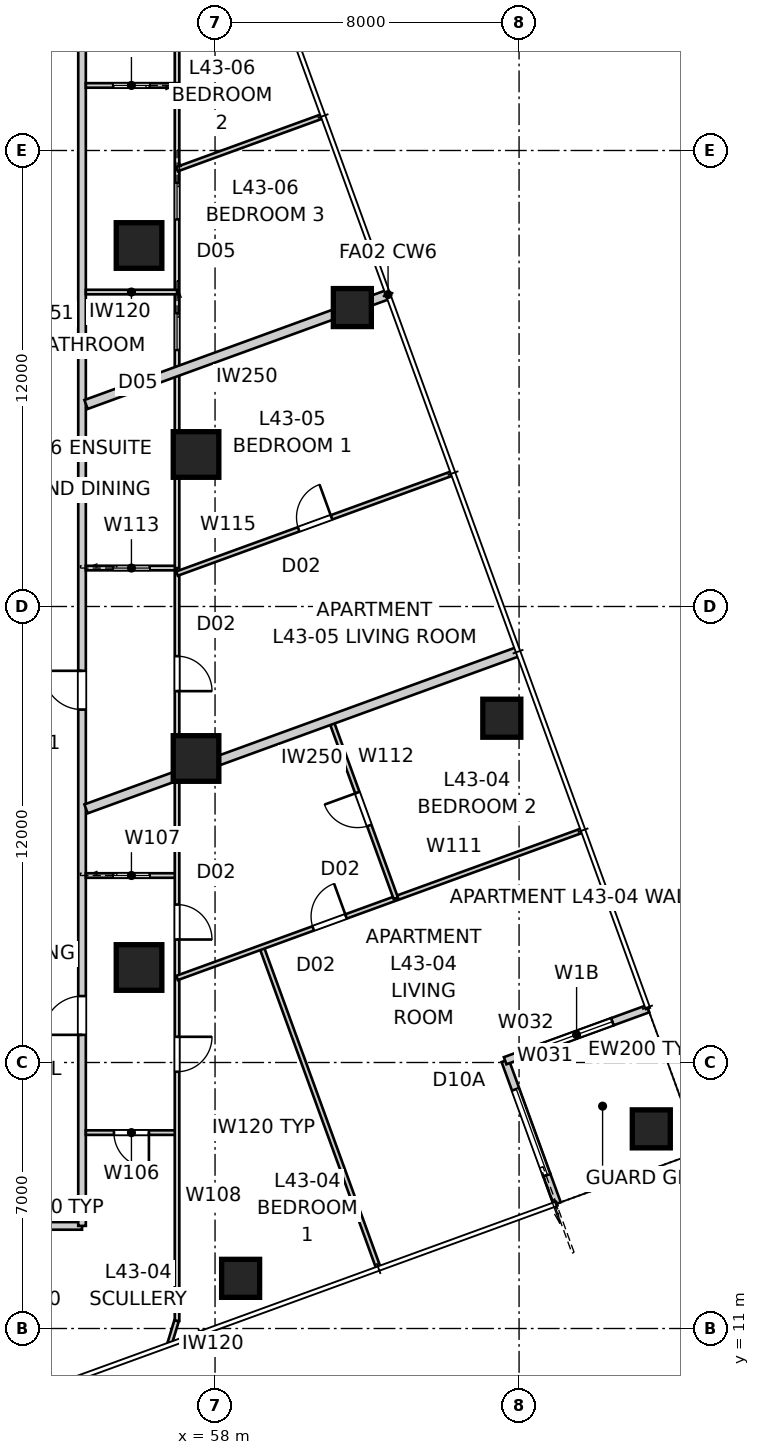
"""IFC4 building model, lengths in metres.
Left out: names, types, materials, properties, quantities, classifications, styles, units other than length and angle.
Written with IfcOpenShell. Run it as: python <this file> out.ifc"""

import sys

from ifc_helpers import new_model, si_unit, direction, frame, frame_2d, origin, origin_2d, place, context, subcontext, project, spatial, rectangle, extrude, element, fill, save


model = new_model("IFC4")
c1 = context("Model", 3, precision=1e-05, world=origin(), true_north=direction((0.0, 1.0)))
c2 = subcontext(c1, "Body", "Model", "MODEL_VIEW")
j1 = project(units=[si_unit("LENGTHUNIT", "METRE"), si_unit("PLANEANGLEUNIT", "RADIAN")], contexts=[c1])
p1 = place(None, origin())
s1 = spatial("IfcSite", under=j1, at=p1, CompositionType="ELEMENT")
p2 = place(p1, origin())
s2 = spatial("IfcBuilding", under=s1, at=p2, CompositionType="ELEMENT")
p3 = place(p2, frame((0.0, 0.0, 157.4)))
s3 = spatial("IfcBuildingStorey", under=s2, at=p3, CompositionType="ELEMENT", Elevation=157.4)
for number, where, z_axis, x_axis in (
    (1, (58.673, 12.32, 0.0), (0.0, 0.0, 1.0), (1.0, 0.0, 0.0)),
    (2, (69.479, 16.253, 0.0), (0.0, 0.0, 1.0), (1.0, 0.0, 0.0)),
    (3, (65.546, 27.06, 0.0), (0.0, 0.0, 1.0), (1.0, 0.0, 0.0)),
    (4, (61.613, 37.866, 0.0), (0.0, 0.0, 1.0), (1.0, 0.0, 0.0)),
):
    element("IfcColumn", number, at=place(p3, frame(where, z_axis=z_axis, x_axis=x_axis)), inside=s3, PredefinedType="COLUMN", context=c2, shape_type="SweptSolid", body=[
        extrude(rectangle(XDim=1.0, YDim=1.0, at=origin_2d()), origin(), (0.0, 0.0, 1.0), 3.4),
    ])
for number, where, z_axis, x_axis in (
    (5, (57.5, 26.0, 0.0), (0.0, 0.0, 1.0), (1.0, 0.0, 0.0)),
    (6, (57.5, 34.0, 0.0), (0.0, 0.0, 1.0), (1.0, 0.0, 0.0)),
    (7, (56.0, 39.5, 0.0), (0.0, 0.0, 1.0), (1.0, 0.0, 0.0)),
    (8, (56.0, 20.5, 0.0), (0.0, 0.0, 1.0), (1.0, 0.0, 0.0)),
):
    element("IfcColumn", number, at=place(p3, frame(where, z_axis=z_axis, x_axis=x_axis)), inside=s3, PredefinedType="COLUMN", context=c2, shape_type="SweptSolid", body=[
        extrude(rectangle(XDim=1.2, YDim=1.2, at=origin_2d()), origin(), (0.0, 0.0, 1.0), 3.4),
    ])
p4 = place(p3, frame((67.002, 14.288, 0.0), z_axis=(0.0, 0.0, 1.0), x_axis=(-0.342110593602, 0.939659694648, 0.0)))
e9 = element("IfcWall", 9, at=p4, inside=s3, PredefinedType="SOLIDWALL", context=c2, shape_type="SweptSolid", body=[
    extrude(rectangle(XDim=0.8, YDim=0.2, at=frame_2d((0.4, 0.0))), origin(), (0.0, 0.0, 1.0), 3.25),
])
p5 = place(p3, frame((66.729, 15.04, 0.0), z_axis=(0.0, 0.0, 1.0), x_axis=(-0.342018703306, 0.939693144909, 0.0)))
e10 = element("IfcWall", 10, at=p5, inside=s3, PredefinedType="SOLIDWALL", context=c2, shape_type="SweptSolid", body=[
    extrude(rectangle(XDim=3.2, YDim=0.2, at=frame_2d((1.6, 0.0))), origin(), (0.0, 0.0, 1.0), 2.722),
])
p6 = place(p5, origin())
e11 = element("IfcOpeningElement", 11, at=p6, cuts=e10, PredefinedType="OPENING", context=c2, shape_type="SweptSolid", body=[
    extrude(rectangle(XDim=2.4, YDim=2.1, at=frame_2d((1.2, 1.05))), frame((0.0, 0.11, 0.0), z_axis=(0.0, -1.0, 0.0), x_axis=(1.0, 0.0, 0.0)), (0.0, 0.0, 1.0), 0.22),
])
p7 = place(p3, frame((65.634, 18.047, 0.0), z_axis=(0.0, 0.0, 1.0), x_axis=(0.939712609717, 0.341965219194, 0.0)))
e12 = element("IfcWall", 12, at=p7, inside=s3, PredefinedType="SOLIDWALL", context=c2, shape_type="SweptSolid", body=[
    extrude(rectangle(XDim=3.0, YDim=0.2, at=frame_2d((1.5, 0.0))), origin(), (0.0, 0.0, 1.0), 2.722),
])
p8 = place(p7, frame((1.0, 0.0, 0.45)))
e13 = element("IfcOpeningElement", 13, at=p8, cuts=e12, PredefinedType="OPENING", context=c2, shape_type="SweptSolid", body=[
    extrude(rectangle(XDim=2.0, YDim=1.8, at=frame_2d((1.0, 0.9))), frame((0.0, 0.11, 0.0), z_axis=(0.0, -1.0, 0.0), x_axis=(1.0, 0.0, 0.0)), (0.0, 0.0, 1.0), 0.22),
])
p9 = place(p3, frame((68.453, 19.073, 0.0), z_axis=(0.0, 0.0, 1.0), x_axis=(0.939686455819, 0.342037080957, 0.0)))
e14 = element("IfcWall", 14, at=p9, inside=s3, PredefinedType="SOLIDWALL", context=c2, shape_type="SweptSolid", body=[
    extrude(rectangle(XDim=1.0, YDim=0.2, at=frame_2d((0.5, 0.0))), origin(), (0.0, 0.0, 1.0), 3.25),
])
p10 = place(p3, frame((49.242, 13.7, 0.0), z_axis=(0.0, 0.0, 1.0), x_axis=(1.0, 0.0, 0.0)))
e15 = element("IfcWall", 15, at=p10, inside=s3, PredefinedType="PARTITIONING", context=c2, shape_type="SweptSolid", body=[
    extrude(rectangle(XDim=5.258, YDim=0.2, at=frame_2d((2.629, 0.0))), origin(), (0.0, 0.0, 1.0), 3.25),
])
p11 = place(p3, frame((54.5, 13.7, 0.0), z_axis=(0.0, 0.0, 1.0), x_axis=(0.0, 1.0, 0.0)))
e16 = element("IfcWall", 16, at=p11, inside=s3, PredefinedType="PARTITIONING", context=c2, shape_type="SweptSolid", body=[
    extrude(rectangle(XDim=33.4, YDim=0.2, at=frame_2d((16.7, 0.0))), origin(), (0.0, 0.0, 1.0), 3.25),
])
p12 = place(p11, frame((5.028, 0.0, 0.0)))
e17 = element("IfcOpeningElement", 17, at=p12, cuts=e16, PredefinedType="OPENING", context=c2, shape_type="SweptSolid", body=[
    extrude(rectangle(XDim=1.02, YDim=2.1, at=frame_2d((0.51, 1.05))), frame((0.0, 0.11, 0.0), z_axis=(0.0, -1.0, 0.0), x_axis=(1.0, 0.0, 0.0)), (0.0, 0.0, 1.0), 0.22),
])
p13 = place(p11, frame((13.587, 0.0, 0.0)))
e18 = element("IfcOpeningElement", 18, at=p13, cuts=e16, PredefinedType="OPENING", context=c2, shape_type="SweptSolid", body=[
    extrude(rectangle(XDim=1.02, YDim=2.34, at=frame_2d((0.51, 1.17))), frame((0.0, 0.11, 0.0), z_axis=(0.0, -1.0, 0.0), x_axis=(1.0, 0.0, 0.0)), (0.0, 0.0, 1.0), 0.22),
])
p14 = place(p3, frame((62.553, 38.208, 0.0), z_axis=(0.0, 0.0, 1.0), x_axis=(-0.939695617736, -0.342011909161, 0.0)))
e19 = element("IfcWall", 19, at=p14, inside=s3, PredefinedType="PARTITIONING", context=c2, shape_type="SweptSolid", body=[
    extrude(rectangle(XDim=8.458, YDim=0.25, at=frame_2d((4.229, 0.0))), origin(), (0.0, 0.0, 1.0), 3.25),
])
p15 = place(p3, frame((65.973, 28.812, 0.0), z_axis=(0.0, 0.0, 1.0), x_axis=(-0.939693801585, -0.342016899091, 0.0)))
e20 = element("IfcWall", 20, at=p15, inside=s3, PredefinedType="PARTITIONING", context=c2, shape_type="SweptSolid", body=[
    extrude(rectangle(XDim=12.097, YDim=0.25, at=frame_2d((6.049, 0.0))), origin(), (0.0, 0.0, 1.0), 3.25),
])
p16 = place(p3, frame((57.0, 16.155, 0.0), z_axis=(0.0, 0.0, 1.0), x_axis=(-1.0, 0.0, 0.0)))
e21 = element("IfcWall", 21, at=p16, inside=s3, PredefinedType="PARTITIONING", context=c2, shape_type="SweptSolid", body=[
    extrude(rectangle(XDim=2.4, YDim=0.12, at=frame_2d((1.2, 0.0))), origin(), (0.0, 0.0, 1.0), 3.25),
])
p17 = place(p16, frame((0.74, 0.0, 0.0)))
e22 = element("IfcOpeningElement", 22, at=p17, cuts=e21, PredefinedType="OPENING", context=c2, shape_type="SweptSolid", body=[
    extrude(rectangle(XDim=0.92, YDim=2.34, at=frame_2d((0.46, 1.17))), frame((0.0, 0.07, 0.0), z_axis=(0.0, -1.0, 0.0), x_axis=(1.0, 0.0, 0.0)), (0.0, 0.0, 1.0), 0.14),
])
p18 = place(p3, frame((54.6, 22.921, 0.0), z_axis=(0.0, 0.0, 1.0), x_axis=(1.0, 0.0, 0.0)))
e23 = element("IfcWall", 23, at=p18, inside=s3, PredefinedType="PARTITIONING", context=c2, shape_type="SweptSolid", body=[
    extrude(rectangle(XDim=2.4, YDim=0.12, at=frame_2d((1.2, 0.0))), origin(), (0.0, 0.0, 1.0), 3.25),
])
p19 = place(p18, frame((0.72, 0.0, 0.0)))
e24 = element("IfcOpeningElement", 24, at=p19, cuts=e23, PredefinedType="OPENING", context=c2, shape_type="SweptSolid", body=[
    extrude(rectangle(XDim=0.96, YDim=2.1, at=frame_2d((0.48, 1.05))), frame((0.0, 0.07, 0.0), z_axis=(0.0, -1.0, 0.0), x_axis=(1.0, 0.0, 0.0)), (0.0, 0.0, 1.0), 0.14),
])
p20 = place(p3, frame((57.0, 30.92, 0.0), z_axis=(0.0, 0.0, 1.0), x_axis=(0.0, -1.0, 0.0)))
e25 = element("IfcWall", 25, at=p20, inside=s3, PredefinedType="PARTITIONING", context=c2, shape_type="SweptSolid", body=[
    extrude(rectangle(XDim=19.72, YDim=0.12, at=frame_2d((9.86, 0.0))), origin(), (0.0, 0.0, 1.0), 2.55),
])
p21 = place(p20, frame((12.243, 0.0, 0.0)))
e26 = element("IfcOpeningElement", 26, at=p21, cuts=e25, PredefinedType="OPENING", context=c2, shape_type="SweptSolid", body=[
    extrude(rectangle(XDim=0.92, YDim=2.34, at=frame_2d((0.46, 1.17))), frame((0.0, 0.07, 0.0), z_axis=(0.0, -1.0, 0.0), x_axis=(1.0, 0.0, 0.0)), (0.0, 0.0, 1.0), 0.14),
])
p22 = place(p20, frame((8.764, 0.0, 0.0)))
e27 = element("IfcOpeningElement", 27, at=p22, cuts=e25, PredefinedType="OPENING", context=c2, shape_type="SweptSolid", body=[
    extrude(rectangle(XDim=0.92, YDim=2.34, at=frame_2d((0.46, 1.17))), frame((0.0, 0.07, 0.0), z_axis=(0.0, -1.0, 0.0), x_axis=(1.0, 0.0, 0.0)), (0.0, 0.0, 1.0), 0.14),
])
p23 = place(p20, frame((2.227, 0.0, 0.0)))
e28 = element("IfcOpeningElement", 28, at=p23, cuts=e25, PredefinedType="OPENING", context=c2, shape_type="SweptSolid", body=[
    extrude(rectangle(XDim=0.92, YDim=2.34, at=frame_2d((0.46, 1.17))), frame((0.0, 0.07, 0.0), z_axis=(0.0, -1.0, 0.0), x_axis=(1.0, 0.0, 0.0)), (0.0, 0.0, 1.0), 0.14),
])
p24 = place(p3, frame((56.987, 11.2, 0.0), z_axis=(0.0, 0.0, 1.0), x_axis=(-0.290455219909, -0.956888585588, 0.0)))
e29 = element("IfcWall", 29, at=p24, inside=s3, PredefinedType="PARTITIONING", context=c2, shape_type="SweptSolid", body=[
    extrude(rectangle(XDim=0.605, YDim=0.12, at=frame_2d((0.303, 0.0))), origin(), (0.0, 0.0, 1.0), 3.25),
])
p25 = place(p3, frame((62.29, 12.615, 0.0), z_axis=(0.0, 0.0, 1.0), x_axis=(-0.342038393654, 0.939685978009, 0.0)))
e30 = element("IfcWall", 30, at=p25, inside=s3, PredefinedType="PARTITIONING", context=c2, shape_type="SweptSolid", body=[
    extrude(rectangle(XDim=8.96, YDim=0.12, at=frame_2d((4.48, 0.0))), origin(), (0.0, 0.0, 1.0), 3.25),
])
p26 = place(p3, frame((57.0, 20.225, 0.0), z_axis=(0.0, 0.0, 1.0), x_axis=(0.939693965364, 0.342016449105, 0.0)))
e31 = element("IfcWall", 31, at=p26, inside=s3, PredefinedType="PARTITIONING", context=c2, shape_type="SweptSolid", body=[
    extrude(rectangle(XDim=11.328, YDim=0.12, at=frame_2d((5.664, 0.0))), origin(), (0.0, 0.0, 1.0), 3.25),
])
p27 = place(p26, frame((3.812, 0.0, 0.0)))
e32 = element("IfcOpeningElement", 32, at=p27, cuts=e31, PredefinedType="OPENING", context=c2, shape_type="SweptSolid", body=[
    extrude(rectangle(XDim=0.92, YDim=2.34, at=frame_2d((0.46, 1.17))), frame((0.0, 0.07, 0.0), z_axis=(0.0, -1.0, 0.0), x_axis=(1.0, 0.0, 0.0)), (0.0, 0.0, 1.0), 0.14),
])
p28 = place(p3, frame((62.757, 22.32, 0.0), z_axis=(0.0, 0.0, 1.0), x_axis=(-0.341993964619, 0.939702148643, 0.0)))
e33 = element("IfcWall", 33, at=p28, inside=s3, PredefinedType="PARTITIONING", context=c2, shape_type="SweptSolid", body=[
    extrude(rectangle(XDim=5.0, YDim=0.12, at=frame_2d((2.5, 0.0))), origin(), (0.0, 0.0, 1.0), 3.25),
])
p29 = place(p28, frame((2.04, 0.0, 0.0)))
e34 = element("IfcOpeningElement", 34, at=p29, cuts=e33, PredefinedType="OPENING", context=c2, shape_type="SweptSolid", body=[
    extrude(rectangle(XDim=0.92, YDim=2.34, at=frame_2d((0.46, 1.17))), frame((0.0, 0.07, 0.0), z_axis=(0.0, -1.0, 0.0), x_axis=(1.0, 0.0, 0.0)), (0.0, 0.0, 1.0), 0.14),
])
p30 = place(p3, frame((54.6, 31.011, 0.0), z_axis=(0.0, 0.0, 1.0), x_axis=(1.0, 0.0, 0.0)))
e35 = element("IfcWall", 35, at=p30, inside=s3, PredefinedType="PARTITIONING", context=c2, shape_type="SweptSolid", body=[
    extrude(rectangle(XDim=2.4, YDim=0.12, at=frame_2d((1.2, 0.0))), origin(), (0.0, 0.0, 1.0), 3.25),
])
p31 = place(p30, frame((0.72, 0.0, 0.0)))
e36 = element("IfcOpeningElement", 36, at=p31, cuts=e35, PredefinedType="OPENING", context=c2, shape_type="SweptSolid", body=[
    extrude(rectangle(XDim=0.96, YDim=2.1, at=frame_2d((0.48, 1.05))), frame((0.0, 0.07, 0.0), z_axis=(0.0, -1.0, 0.0), x_axis=(1.0, 0.0, 0.0)), (0.0, 0.0, 1.0), 0.14),
])
p32 = place(p3, frame((57.0, 49.6, 0.0), z_axis=(0.0, 0.0, 1.0), x_axis=(0.0, -1.0, 0.0)))
e37 = element("IfcWall", 37, at=p32, inside=s3, PredefinedType="PARTITIONING", context=c2, shape_type="SweptSolid", body=[
    extrude(rectangle(XDim=18.589, YDim=0.12, at=frame_2d((9.294, 0.0))), origin(), (0.0, 0.0, 1.0), 2.55),
])
p33 = place(p32, frame((8.452, 0.0, 0.0)))
e38 = element("IfcOpeningElement", 38, at=p33, cuts=e37, PredefinedType="OPENING", context=c2, shape_type="SweptSolid", body=[
    extrude(rectangle(XDim=0.96, YDim=2.1, at=frame_2d((0.48, 1.05))), frame((0.0, 0.07, 0.0), z_axis=(0.0, -1.0, 0.0), x_axis=(1.0, 0.0, 0.0)), (0.0, 0.0, 1.0), 0.14),
])
p34 = place(p32, frame((11.889, 0.0, 0.0)))
e39 = element("IfcOpeningElement", 39, at=p34, cuts=e37, PredefinedType="OPENING", context=c2, shape_type="SweptSolid", body=[
    extrude(rectangle(XDim=0.96, YDim=2.1, at=frame_2d((0.48, 1.05))), frame((0.0, 0.07, 0.0), z_axis=(0.0, -1.0, 0.0), x_axis=(1.0, 0.0, 0.0)), (0.0, 0.0, 1.0), 0.14),
])
p35 = place(p3, frame((57.0, 30.866, 0.0), z_axis=(0.0, 0.0, 1.0), x_axis=(0.939685835373, 0.342038785519, 0.0)))
e40 = element("IfcWall", 40, at=p35, inside=s3, PredefinedType="PARTITIONING", context=c2, shape_type="SweptSolid", body=[
    extrude(rectangle(XDim=7.689, YDim=0.12, at=frame_2d((3.844, 0.0))), origin(), (0.0, 0.0, 1.0), 3.25),
])
p36 = place(p35, frame((3.404, 0.0, 0.0)))
e41 = element("IfcOpeningElement", 41, at=p36, cuts=e40, PredefinedType="OPENING", context=c2, shape_type="SweptSolid", body=[
    extrude(rectangle(XDim=0.92, YDim=2.34, at=frame_2d((0.46, 1.17))), frame((0.0, 0.07, 0.0), z_axis=(0.0, -1.0, 0.0), x_axis=(1.0, 0.0, 0.0)), (0.0, 0.0, 1.0), 0.14),
])
p37 = place(p3, frame((57.0, 43.712, 0.0), z_axis=(0.0, 0.0, 1.0), x_axis=(-1.0, 0.0, 0.0)))
e42 = element("IfcWall", 42, at=p37, inside=s3, PredefinedType="PARTITIONING", context=c2, shape_type="SweptSolid", body=[
    extrude(rectangle(XDim=2.4, YDim=0.12, at=frame_2d((1.2, 0.0))), origin(), (0.0, 0.0, 1.0), 3.25),
])
p38 = place(p37, frame((0.72, 0.0, 0.0)))
e43 = element("IfcOpeningElement", 43, at=p38, cuts=e42, PredefinedType="OPENING", context=c2, shape_type="SweptSolid", body=[
    extrude(rectangle(XDim=0.96, YDim=2.1, at=frame_2d((0.48, 1.05))), frame((0.0, 0.07, 0.0), z_axis=(0.0, -1.0, 0.0), x_axis=(1.0, 0.0, 0.0)), (0.0, 0.0, 1.0), 0.14),
])
p39 = place(p3, frame((57.0, 38.275, 0.0), z_axis=(0.0, 0.0, 1.0), x_axis=(-1.0, 0.0, 0.0)))
e44 = element("IfcWall", 44, at=p39, inside=s3, PredefinedType="PARTITIONING", context=c2, shape_type="SweptSolid", body=[
    extrude(rectangle(XDim=2.4, YDim=0.12, at=frame_2d((1.2, 0.0))), origin(), (0.0, 0.0, 1.0), 3.25),
])
p40 = place(p3, frame((60.805, 42.893, 0.0), z_axis=(0.0, 0.0, 1.0), x_axis=(-0.939682468191, -0.342048036063, 0.0)))
e45 = element("IfcWall", 45, at=p40, inside=s3, PredefinedType="PARTITIONING", context=c2, shape_type="SweptSolid", body=[
    extrude(rectangle(XDim=4.049, YDim=0.12, at=frame_2d((2.024, 0.0))), origin(), (0.0, 0.0, 1.0), 3.25),
])
p41 = place(p6, origin())
e46 = element("IfcDoor", 46, at=p41, inside=s3, OperationType="SLIDING_TO_LEFT", PredefinedType="DOOR", context=c2, shape_type="SweptSolid", body=[
    extrude(rectangle(XDim=2.4, YDim=2.1, at=frame_2d((1.2, 1.05))), frame((0.0, 0.025, 0.0), z_axis=(0.0, -1.0, 0.0), x_axis=(1.0, 0.0, 0.0)), (0.0, 0.0, 1.0), 0.05),
])
fill(e11, e46)
p42 = place(p8, origin())
e47 = element("IfcWindow", 47, at=p42, inside=s3, PartitioningType="SINGLE_PANEL", PredefinedType="WINDOW", context=c2, shape_type="SweptSolid", body=[
    extrude(rectangle(XDim=2.0, YDim=1.8, at=frame_2d((1.0, 0.9))), frame((0.0, 0.03, 0.0), z_axis=(0.0, -1.0, 0.0), x_axis=(1.0, 0.0, 0.0)), (0.0, 0.0, 1.0), 0.06),
])
fill(e13, e47)
p43 = place(p12, origin())
e48 = element("IfcDoor", 48, at=p43, inside=s3, OperationType="SINGLE_SWING_LEFT", PredefinedType="DOOR", context=c2, shape_type="SweptSolid", body=[
    extrude(rectangle(XDim=1.02, YDim=2.1, at=frame_2d((0.51, 1.05))), frame((0.0, 0.025, 0.0), z_axis=(0.0, -1.0, 0.0), x_axis=(1.0, 0.0, 0.0)), (0.0, 0.0, 1.0), 0.05),
])
fill(e17, e48)
p44 = place(p13, origin())
e49 = element("IfcDoor", 49, at=p44, inside=s3, OperationType="SINGLE_SWING_RIGHT", PredefinedType="DOOR", context=c2, shape_type="SweptSolid", body=[
    extrude(rectangle(XDim=1.02, YDim=2.34, at=frame_2d((0.51, 1.17))), frame((0.0, 0.025, 0.0), z_axis=(0.0, -1.0, 0.0), x_axis=(1.0, 0.0, 0.0)), (0.0, 0.0, 1.0), 0.05),
])
fill(e18, e49)
p45 = place(p38, origin())
e50 = element("IfcDoor", 50, at=p45, inside=s3, OperationType="SLIDING_TO_LEFT", PredefinedType="DOOR", context=c2, shape_type="SweptSolid", body=[
    extrude(rectangle(XDim=0.96, YDim=2.1, at=frame_2d((0.48, 1.05))), frame((0.0, 0.025, 0.0), z_axis=(0.0, -1.0, 0.0), x_axis=(1.0, 0.0, 0.0)), (0.0, 0.0, 1.0), 0.05),
])
fill(e43, e50)
p46 = place(p21, origin())
e51 = element("IfcDoor", 51, at=p46, inside=s3, OperationType="SINGLE_SWING_LEFT", PredefinedType="DOOR", context=c2, shape_type="SweptSolid", body=[
    extrude(rectangle(XDim=0.92, YDim=2.34, at=frame_2d((0.46, 1.17))), frame((0.0, 0.025, 0.0), z_axis=(0.0, -1.0, 0.0), x_axis=(1.0, 0.0, 0.0)), (0.0, 0.0, 1.0), 0.05),
])
fill(e26, e51)
p47 = place(p22, origin())
e52 = element("IfcDoor", 52, at=p47, inside=s3, OperationType="SINGLE_SWING_RIGHT", PredefinedType="DOOR", context=c2, shape_type="SweptSolid", body=[
    extrude(rectangle(XDim=0.92, YDim=2.34, at=frame_2d((0.46, 1.17))), frame((0.0, 0.025, 0.0), z_axis=(0.0, -1.0, 0.0), x_axis=(1.0, 0.0, 0.0)), (0.0, 0.0, 1.0), 0.05),
])
fill(e27, e52)
p48 = place(p17, origin())
e53 = element("IfcDoor", 53, at=p48, inside=s3, OperationType="SINGLE_SWING_LEFT", PredefinedType="DOOR", context=c2, shape_type="SweptSolid", body=[
    extrude(rectangle(XDim=0.92, YDim=2.34, at=frame_2d((0.46, 1.17))), frame((0.0, 0.025, 0.0), z_axis=(0.0, -1.0, 0.0), x_axis=(1.0, 0.0, 0.0)), (0.0, 0.0, 1.0), 0.05),
])
fill(e22, e53)
p49 = place(p19, origin())
e54 = element("IfcDoor", 54, at=p49, inside=s3, OperationType="SLIDING_TO_LEFT", PredefinedType="DOOR", context=c2, shape_type="SweptSolid", body=[
    extrude(rectangle(XDim=0.96, YDim=2.1, at=frame_2d((0.48, 1.05))), frame((0.0, 0.025, 0.0), z_axis=(0.0, -1.0, 0.0), x_axis=(1.0, 0.0, 0.0)), (0.0, 0.0, 1.0), 0.05),
])
fill(e24, e54)
p50 = place(p23, origin())
e55 = element("IfcDoor", 55, at=p50, inside=s3, OperationType="SINGLE_SWING_RIGHT", PredefinedType="DOOR", context=c2, shape_type="SweptSolid", body=[
    extrude(rectangle(XDim=0.92, YDim=2.34, at=frame_2d((0.46, 1.17))), frame((0.0, 0.025, 0.0), z_axis=(0.0, -1.0, 0.0), x_axis=(1.0, 0.0, 0.0)), (0.0, 0.0, 1.0), 0.05),
])
fill(e28, e55)
p51 = place(p31, origin())
e56 = element("IfcDoor", 56, at=p51, inside=s3, OperationType="SLIDING_TO_LEFT", PredefinedType="DOOR", context=c2, shape_type="SweptSolid", body=[
    extrude(rectangle(XDim=0.96, YDim=2.1, at=frame_2d((0.48, 1.05))), frame((0.0, 0.025, 0.0), z_axis=(0.0, -1.0, 0.0), x_axis=(1.0, 0.0, 0.0)), (0.0, 0.0, 1.0), 0.05),
])
fill(e36, e56)
p52 = place(p33, origin())
e57 = element("IfcDoor", 57, at=p52, inside=s3, OperationType="SLIDING_TO_LEFT", PredefinedType="DOOR", context=c2, shape_type="SweptSolid", body=[
    extrude(rectangle(XDim=0.96, YDim=2.1, at=frame_2d((0.48, 1.05))), frame((0.0, 0.025, 0.0), z_axis=(0.0, -1.0, 0.0), x_axis=(1.0, 0.0, 0.0)), (0.0, 0.0, 1.0), 0.05),
])
fill(e38, e57)
p53 = place(p29, origin())
e58 = element("IfcDoor", 58, at=p53, inside=s3, OperationType="SINGLE_SWING_RIGHT", PredefinedType="DOOR", context=c2, shape_type="SweptSolid", body=[
    extrude(rectangle(XDim=0.92, YDim=2.34, at=frame_2d((0.46, 1.17))), frame((0.0, 0.025, 0.0), z_axis=(0.0, -1.0, 0.0), x_axis=(1.0, 0.0, 0.0)), (0.0, 0.0, 1.0), 0.05),
])
fill(e34, e58)
p54 = place(p27, origin())
e59 = element("IfcDoor", 59, at=p54, inside=s3, OperationType="SINGLE_SWING_RIGHT", PredefinedType="DOOR", context=c2, shape_type="SweptSolid", body=[
    extrude(rectangle(XDim=0.92, YDim=2.34, at=frame_2d((0.46, 1.17))), frame((0.0, 0.025, 0.0), z_axis=(0.0, -1.0, 0.0), x_axis=(1.0, 0.0, 0.0)), (0.0, 0.0, 1.0), 0.05),
])
fill(e32, e59)
p55 = place(p36, origin())
e60 = element("IfcDoor", 60, at=p55, inside=s3, OperationType="SINGLE_SWING_RIGHT", PredefinedType="DOOR", context=c2, shape_type="SweptSolid", body=[
    extrude(rectangle(XDim=0.92, YDim=2.34, at=frame_2d((0.46, 1.17))), frame((0.0, 0.025, 0.0), z_axis=(0.0, -1.0, 0.0), x_axis=(1.0, 0.0, 0.0)), (0.0, 0.0, 1.0), 0.05),
])
fill(e41, e60)
p56 = place(p34, origin())
e61 = element("IfcDoor", 61, at=p56, inside=s3, OperationType="SLIDING_TO_LEFT", PredefinedType="DOOR", context=c2, shape_type="SweptSolid", body=[
    extrude(rectangle(XDim=0.96, YDim=2.1, at=frame_2d((0.48, 1.05))), frame((0.0, 0.025, 0.0), z_axis=(0.0, -1.0, 0.0), x_axis=(1.0, 0.0, 0.0)), (0.0, 0.0, 1.0), 0.05),
])
fill(e39, e61)
save(model, sys.argv[1])
